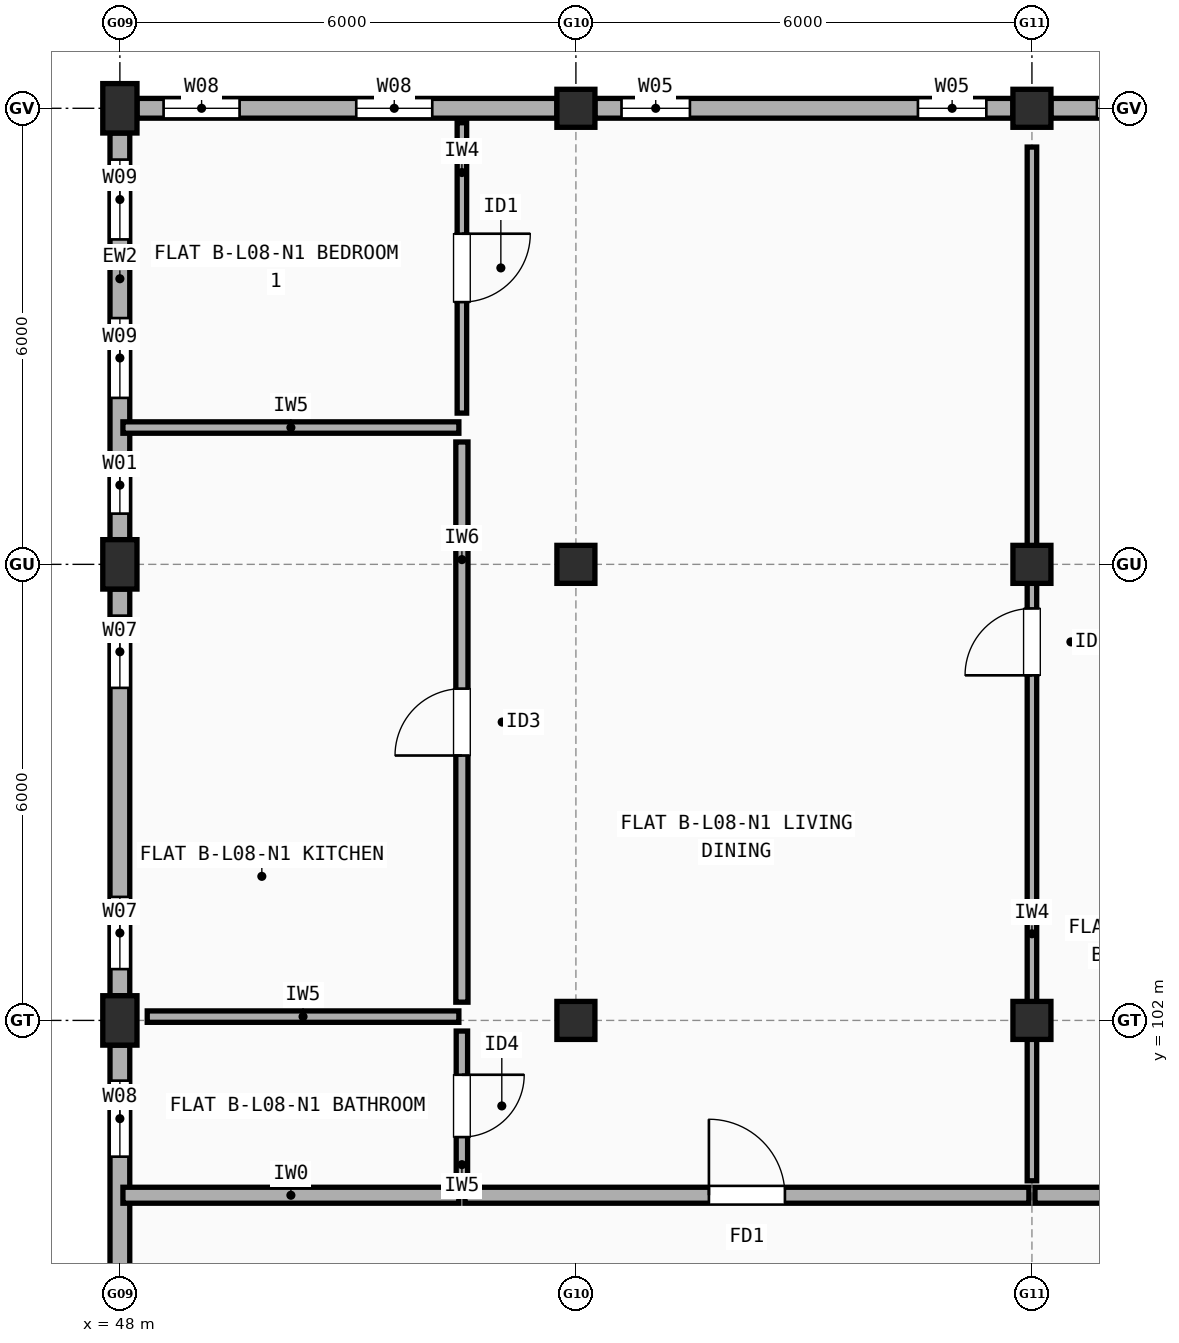
"""IFC4 building model, lengths in metres.
Left out: names, types, materials, properties, quantities, classifications, styles, units other than length and angle.
Written with IfcOpenShell. Run it as: python <this file> out.ifc"""

import sys

from ifc_helpers import new_model, si_unit, direction, frame, frame_2d, origin, origin_2d, place, context, subcontext, project, spatial, rectangle, extrude, element, fill, save


model = new_model("IFC4")
c1 = context("Model", 3, precision=1e-05, world=origin(), true_north=direction((0.0, 1.0)))
c2 = subcontext(c1, "Body", "Model", "MODEL_VIEW")
j1 = project(units=[si_unit("LENGTHUNIT", "METRE"), si_unit("PLANEANGLEUNIT", "RADIAN")], contexts=[c1])
p1 = place(None, origin())
s1 = spatial("IfcSite", under=j1, at=p1, CompositionType="ELEMENT")
p2 = place(p1, origin())
s2 = spatial("IfcBuilding", under=s1, at=p2, CompositionType="ELEMENT")
p3 = place(p2, frame((0.0, 0.0, 26.9)))
s3 = spatial("IfcBuildingStorey", under=s2, at=p3, CompositionType="ELEMENT", Elevation=26.9)
for number, where, z_axis, x_axis in (
    (1, (48.0, 102.0, 0.0), (0.0, 0.0, 1.0), (1.0, 0.0, 0.0)),
    (2, (48.0, 108.0, 0.0), (0.0, 0.0, 1.0), (1.0, 0.0, 0.0)),
    (3, (48.0, 114.0, 0.0), (0.0, 0.0, 1.0), (1.0, 0.0, 0.0)),
):
    element("IfcColumn", number, at=place(p3, frame(where, z_axis=z_axis, x_axis=x_axis)), inside=s3, PredefinedType="COLUMN", context=c2, shape_type="SweptSolid", body=[
        extrude(rectangle(XDim=0.45, YDim=0.65, at=origin_2d()), origin(), (0.0, 0.0, 1.0), 2.98),
    ])
for number, where, z_axis, x_axis in (
    (4, (54.0, 102.0, 0.0), (0.0, 0.0, 1.0), (1.0, 0.0, 0.0)),
    (5, (54.0, 108.0, 0.0), (0.0, 0.0, 1.0), (1.0, 0.0, 0.0)),
    (6, (54.0, 114.0, 0.0), (0.0, 0.0, 1.0), (1.0, 0.0, 0.0)),
    (7, (60.0, 102.0, 0.0), (0.0, 0.0, 1.0), (1.0, 0.0, 0.0)),
    (8, (60.0, 108.0, 0.0), (0.0, 0.0, 1.0), (1.0, 0.0, 0.0)),
    (9, (60.0, 114.0, 0.0), (0.0, 0.0, 1.0), (1.0, 0.0, 0.0)),
):
    element("IfcColumn", number, at=place(p3, frame(where, z_axis=z_axis, x_axis=x_axis)), inside=s3, PredefinedType="COLUMN", context=c2, shape_type="SweptSolid", body=[
        extrude(rectangle(XDim=0.5, YDim=0.5, at=origin_2d()), origin(), (0.0, 0.0, 1.0), 2.98),
    ])
p4 = place(p3, frame((65.75, 114.0, 0.0), z_axis=(0.0, 0.0, 1.0), x_axis=(-1.0, 0.0, 0.0)))
e10 = element("IfcWall", 10, at=p4, inside=s3, PredefinedType="STANDARD", context=c2, shape_type="SweptSolid", body=[
    extrude(rectangle(XDim=5.5, YDim=0.26, at=frame_2d((2.75, 0.0))), origin(), (0.0, 0.0, 1.0), 2.462),
])
p5 = place(p4, frame((0.755, 0.0, 0.9)))
e11 = element("IfcOpeningElement", 11, at=p5, cuts=e10, PredefinedType="OPENING", context=c2, shape_type="SweptSolid", body=[
    extrude(rectangle(XDim=1.2, YDim=1.35, at=frame_2d((0.6, 0.675))), frame((0.0, 0.14, 0.0), z_axis=(0.0, -1.0, 0.0), x_axis=(1.0, 0.0, 0.0)), (0.0, 0.0, 1.0), 0.28),
])
p6 = place(p4, frame((3.395, 0.0, 0.9)))
e12 = element("IfcOpeningElement", 12, at=p6, cuts=e10, PredefinedType="OPENING", context=c2, shape_type="SweptSolid", body=[
    extrude(rectangle(XDim=1.5, YDim=1.4, at=frame_2d((0.75, 0.7))), frame((0.0, 0.14, 0.0), z_axis=(0.0, -1.0, 0.0), x_axis=(1.0, 0.0, 0.0)), (0.0, 0.0, 1.0), 0.28),
])
p7 = place(p3, frame((59.75, 114.0, 0.0), z_axis=(0.0, 0.0, 1.0), x_axis=(-1.0, 0.0, 0.0)))
e13 = element("IfcWall", 13, at=p7, inside=s3, PredefinedType="STANDARD", context=c2, shape_type="SweptSolid", body=[
    extrude(rectangle(XDim=5.5, YDim=0.26, at=frame_2d((2.75, 0.0))), origin(), (0.0, 0.0, 1.0), 2.462),
])
p8 = place(p7, frame((0.35, 0.0, 0.9)))
e14 = element("IfcOpeningElement", 14, at=p8, cuts=e13, PredefinedType="OPENING", context=c2, shape_type="SweptSolid", body=[
    extrude(rectangle(XDim=0.9, YDim=1.4, at=frame_2d((0.45, 0.7))), frame((0.0, 0.14, 0.0), z_axis=(0.0, -1.0, 0.0), x_axis=(1.0, 0.0, 0.0)), (0.0, 0.0, 1.0), 0.28),
])
p9 = place(p7, frame((4.25, 0.0, 0.9)))
e15 = element("IfcOpeningElement", 15, at=p9, cuts=e13, PredefinedType="OPENING", context=c2, shape_type="SweptSolid", body=[
    extrude(rectangle(XDim=0.9, YDim=1.4, at=frame_2d((0.45, 0.7))), frame((0.0, 0.14, 0.0), z_axis=(0.0, -1.0, 0.0), x_axis=(1.0, 0.0, 0.0)), (0.0, 0.0, 1.0), 0.28),
])
p10 = place(p3, frame((53.75, 114.0, 0.0), z_axis=(0.0, 0.0, 1.0), x_axis=(-1.0, 0.0, 0.0)))
e16 = element("IfcWall", 16, at=p10, inside=s3, PredefinedType="STANDARD", context=c2, shape_type="SweptSolid", body=[
    extrude(rectangle(XDim=5.525, YDim=0.26, at=frame_2d((2.762, 0.0))), origin(), (0.0, 0.0, 1.0), 2.462),
])
p11 = place(p10, frame((1.64, 0.0, 0.9)))
e17 = element("IfcOpeningElement", 17, at=p11, cuts=e16, PredefinedType="OPENING", context=c2, shape_type="SweptSolid", body=[
    extrude(rectangle(XDim=1.0, YDim=1.4, at=frame_2d((0.5, 0.7))), frame((0.0, 0.14, 0.0), z_axis=(0.0, -1.0, 0.0), x_axis=(1.0, 0.0, 0.0)), (0.0, 0.0, 1.0), 0.28),
])
p12 = place(p10, frame((4.175, 0.0, 0.9)))
e18 = element("IfcOpeningElement", 18, at=p12, cuts=e16, PredefinedType="OPENING", context=c2, shape_type="SweptSolid", body=[
    extrude(rectangle(XDim=1.0, YDim=1.4, at=frame_2d((0.5, 0.7))), frame((0.0, 0.14, 0.0), z_axis=(0.0, -1.0, 0.0), x_axis=(1.0, 0.0, 0.0)), (0.0, 0.0, 1.0), 0.28),
])
p13 = place(p3, frame((48.0, 113.675, 0.0), z_axis=(0.0, 0.0, 1.0), x_axis=(0.0, -1.0, 0.0)))
e19 = element("IfcWall", 19, at=p13, inside=s3, PredefinedType="STANDARD", context=c2, shape_type="SweptSolid", body=[
    extrude(rectangle(XDim=5.35, YDim=0.26, at=frame_2d((2.675, 0.0))), origin(), (0.0, 0.0, 1.0), 2.462),
])
p14 = place(p13, frame((0.35, 0.0, 0.9)))
e20 = element("IfcOpeningElement", 20, at=p14, cuts=e19, PredefinedType="OPENING", context=c2, shape_type="SweptSolid", body=[
    extrude(rectangle(XDim=1.05, YDim=1.35, at=frame_2d((0.525, 0.675))), frame((0.0, 0.14, 0.0), z_axis=(0.0, -1.0, 0.0), x_axis=(1.0, 0.0, 0.0)), (0.0, 0.0, 1.0), 0.28),
])
p15 = place(p13, frame((2.435, 0.0, 0.9)))
e21 = element("IfcOpeningElement", 21, at=p15, cuts=e19, PredefinedType="OPENING", context=c2, shape_type="SweptSolid", body=[
    extrude(rectangle(XDim=1.05, YDim=1.35, at=frame_2d((0.525, 0.675))), frame((0.0, 0.14, 0.0), z_axis=(0.0, -1.0, 0.0), x_axis=(1.0, 0.0, 0.0)), (0.0, 0.0, 1.0), 0.28),
])
p16 = place(p13, frame((4.258, 0.0, 0.9)))
e22 = element("IfcOpeningElement", 22, at=p16, cuts=e19, PredefinedType="OPENING", context=c2, shape_type="SweptSolid", body=[
    extrude(rectangle(XDim=0.75, YDim=1.15, at=frame_2d((0.375, 0.575))), frame((0.0, 0.14, 0.0), z_axis=(0.0, -1.0, 0.0), x_axis=(1.0, 0.0, 0.0)), (0.0, 0.0, 1.0), 0.28),
])
p17 = place(p3, frame((48.0, 107.675, 0.0), z_axis=(0.0, 0.0, 1.0), x_axis=(0.0, -1.0, 0.0)))
e23 = element("IfcWall", 23, at=p17, inside=s3, PredefinedType="STANDARD", context=c2, shape_type="SweptSolid", body=[
    extrude(rectangle(XDim=5.35, YDim=0.26, at=frame_2d((2.675, 0.0))), origin(), (0.0, 0.0, 1.0), 2.462),
])
p18 = place(p17, frame((0.35, 0.0, 0.9)))
e24 = element("IfcOpeningElement", 24, at=p18, cuts=e23, PredefinedType="OPENING", context=c2, shape_type="SweptSolid", body=[
    extrude(rectangle(XDim=0.95, YDim=1.35, at=frame_2d((0.475, 0.675))), frame((0.0, 0.14, 0.0), z_axis=(0.0, -1.0, 0.0), x_axis=(1.0, 0.0, 0.0)), (0.0, 0.0, 1.0), 0.28),
])
p19 = place(p17, frame((4.05, 0.0, 0.9)))
e25 = element("IfcOpeningElement", 25, at=p19, cuts=e23, PredefinedType="OPENING", context=c2, shape_type="SweptSolid", body=[
    extrude(rectangle(XDim=0.95, YDim=1.35, at=frame_2d((0.475, 0.675))), frame((0.0, 0.14, 0.0), z_axis=(0.0, -1.0, 0.0), x_axis=(1.0, 0.0, 0.0)), (0.0, 0.0, 1.0), 0.28),
])
p20 = place(p3, frame((48.0, 101.675, 0.0), z_axis=(0.0, 0.0, 1.0), x_axis=(0.0, -1.0, 0.0)))
e26 = element("IfcWall", 26, at=p20, inside=s3, PredefinedType="STANDARD", context=c2, shape_type="SweptSolid", body=[
    extrude(rectangle(XDim=5.35, YDim=0.26, at=frame_2d((2.675, 0.0))), origin(), (0.0, 0.0, 1.0), 2.462),
])
p21 = place(p20, frame((0.468, 0.0, 0.9)))
e27 = element("IfcOpeningElement", 27, at=p21, cuts=e26, PredefinedType="OPENING", context=c2, shape_type="SweptSolid", body=[
    extrude(rectangle(XDim=1.0, YDim=1.4, at=frame_2d((0.5, 0.7))), frame((0.0, 0.14, 0.0), z_axis=(0.0, -1.0, 0.0), x_axis=(1.0, 0.0, 0.0)), (0.0, 0.0, 1.0), 0.28),
])
p22 = place(p20, frame((3.083, 0.0, 0.9)))
e28 = element("IfcOpeningElement", 28, at=p22, cuts=e26, PredefinedType="OPENING", context=c2, shape_type="SweptSolid", body=[
    extrude(rectangle(XDim=1.2, YDim=1.35, at=frame_2d((0.6, 0.675))), frame((0.0, 0.14, 0.0), z_axis=(0.0, -1.0, 0.0), x_axis=(1.0, 0.0, 0.0)), (0.0, 0.0, 1.0), 0.28),
])
p23 = place(p3, frame((48.04, 99.7, 0.0), z_axis=(0.0, 0.0, 1.0), x_axis=(1.0, 0.0, 0.0)))
e29 = element("IfcWall", 29, at=p23, inside=s3, PredefinedType="SOLIDWALL", context=c2, shape_type="SweptSolid", body=[
    extrude(rectangle(XDim=4.42, YDim=0.21, at=frame_2d((2.21, 0.0))), origin(), (0.0, 0.0, 1.0), 2.462),
])
p24 = place(p3, frame((52.54, 99.7, 0.0), z_axis=(0.0, 0.0, 1.0), x_axis=(1.0, 0.0, 0.0)))
e30 = element("IfcWall", 30, at=p24, inside=s3, PredefinedType="SOLIDWALL", context=c2, shape_type="SweptSolid", body=[
    extrude(rectangle(XDim=7.42, YDim=0.21, at=frame_2d((3.71, 0.0))), origin(), (0.0, 0.0, 1.0), 2.508),
])
p25 = place(p24, frame((3.21, 0.0, 0.0)))
e31 = element("IfcOpeningElement", 31, at=p25, cuts=e30, PredefinedType="OPENING", context=c2, shape_type="SweptSolid", body=[
    extrude(rectangle(XDim=1.0, YDim=2.15, at=frame_2d((0.5, 1.075))), frame((0.0, 0.115, 0.0), z_axis=(0.0, -1.0, 0.0), x_axis=(1.0, 0.0, 0.0)), (0.0, 0.0, 1.0), 0.23),
])
p26 = place(p3, frame((52.5, 109.99, 0.0), z_axis=(0.0, 0.0, 1.0), x_axis=(0.0, 1.0, 0.0)))
e32 = element("IfcWall", 32, at=p26, inside=s3, PredefinedType="PARTITIONING", context=c2, shape_type="SweptSolid", body=[
    extrude(rectangle(XDim=3.82, YDim=0.125, at=frame_2d((1.91, 0.0))), origin(), (0.0, 0.0, 1.0), 2.98),
])
p27 = place(p26, frame((1.46, 0.0, 0.0)))
e33 = element("IfcOpeningElement", 33, at=p27, cuts=e32, PredefinedType="OPENING", context=c2, shape_type="SweptSolid", body=[
    extrude(rectangle(XDim=0.9, YDim=2.1, at=frame_2d((0.45, 1.05))), frame((0.0, 0.073, 0.0), z_axis=(0.0, -1.0, 0.0), x_axis=(1.0, 0.0, 0.0)), (0.0, 0.0, 1.0), 0.145),
])
p28 = place(p3, frame((52.5, 102.24, 0.0), z_axis=(0.0, 0.0, 1.0), x_axis=(0.0, 1.0, 0.0)))
e34 = element("IfcWall", 34, at=p28, inside=s3, PredefinedType="PLUMBINGWALL", context=c2, shape_type="SweptSolid", body=[
    extrude(rectangle(XDim=7.37, YDim=0.16, at=frame_2d((3.685, 0.0))), origin(), (0.0, 0.0, 1.0), 2.462),
])
p29 = place(p28, frame((3.245, 0.0, 0.0)))
e35 = element("IfcOpeningElement", 35, at=p29, cuts=e34, PredefinedType="OPENING", context=c2, shape_type="SweptSolid", body=[
    extrude(rectangle(XDim=0.88, YDim=2.1, at=frame_2d((0.44, 1.05))), frame((0.0, 0.09, 0.0), z_axis=(0.0, -1.0, 0.0), x_axis=(1.0, 0.0, 0.0)), (0.0, 0.0, 1.0), 0.18),
])
p30 = place(p3, frame((52.5, 99.89, 0.0), z_axis=(0.0, 0.0, 1.0), x_axis=(0.0, 1.0, 0.0)))
e36 = element("IfcWall", 36, at=p30, inside=s3, PredefinedType="PARTITIONING", context=c2, shape_type="SweptSolid", body=[
    extrude(rectangle(XDim=1.97, YDim=0.15, at=frame_2d((0.985, 0.0))), origin(), (0.0, 0.0, 1.0), 2.98),
])
p31 = place(p30, frame((0.575, 0.0, 0.0)))
e37 = element("IfcOpeningElement", 37, at=p31, cuts=e36, PredefinedType="OPENING", context=c2, shape_type="SweptSolid", body=[
    extrude(rectangle(XDim=0.82, YDim=2.08, at=frame_2d((0.41, 1.04))), frame((0.0, 0.085, 0.0), z_axis=(0.0, -1.0, 0.0), x_axis=(1.0, 0.0, 0.0)), (0.0, 0.0, 1.0), 0.17),
])
p32 = place(p3, frame((48.04, 109.8, 0.0), z_axis=(0.0, 0.0, 1.0), x_axis=(1.0, 0.0, 0.0)))
e38 = element("IfcWall", 38, at=p32, inside=s3, PredefinedType="PARTITIONING", context=c2, shape_type="SweptSolid", body=[
    extrude(rectangle(XDim=4.42, YDim=0.15, at=frame_2d((2.21, 0.0))), origin(), (0.0, 0.0, 1.0), 2.462),
])
p33 = place(p3, frame((48.36, 102.05, 0.0), z_axis=(0.0, 0.0, 1.0), x_axis=(1.0, 0.0, 0.0)))
e39 = element("IfcWall", 39, at=p33, inside=s3, PredefinedType="PARTITIONING", context=c2, shape_type="SweptSolid", body=[
    extrude(rectangle(XDim=4.1, YDim=0.15, at=frame_2d((2.05, 0.0))), origin(), (0.0, 0.0, 1.0), 2.462),
])
p34 = place(p3, frame((60.04, 99.7, 0.0), z_axis=(0.0, 0.0, 1.0), x_axis=(1.0, 0.0, 0.0)))
e40 = element("IfcWall", 40, at=p34, inside=s3, PredefinedType="SOLIDWALL", context=c2, shape_type="SweptSolid", body=[
    extrude(rectangle(XDim=2.92, YDim=0.21, at=frame_2d((1.46, 0.0))), origin(), (0.0, 0.0, 1.0), 2.508),
])
p35 = place(p3, frame((60.0, 99.89, 0.0), z_axis=(0.0, 0.0, 1.0), x_axis=(0.0, 1.0, 0.0)))
e41 = element("IfcWall", 41, at=p35, inside=s3, PredefinedType="PARTITIONING", context=c2, shape_type="SweptSolid", body=[
    extrude(rectangle(XDim=13.6, YDim=0.125, at=frame_2d((6.8, 0.0))), origin(), (0.0, 0.0, 1.0), 2.458),
])
p36 = place(p35, frame((6.65, 0.0, 0.0)))
e42 = element("IfcOpeningElement", 42, at=p36, cuts=e41, PredefinedType="OPENING", context=c2, shape_type="SweptSolid", body=[
    extrude(rectangle(XDim=0.88, YDim=2.1, at=frame_2d((0.44, 1.05))), frame((0.0, 0.073, 0.0), z_axis=(0.0, -1.0, 0.0), x_axis=(1.0, 0.0, 0.0)), (0.0, 0.0, 1.0), 0.145),
])
p37 = place(p6, origin())
e43 = element("IfcWindow", 43, at=p37, inside=s3, PartitioningType="SINGLE_PANEL", PredefinedType="WINDOW", context=c2, shape_type="SweptSolid", body=[
    extrude(rectangle(XDim=1.5, YDim=1.4, at=frame_2d((0.75, 0.7))), frame((0.0, 0.03, 0.0), z_axis=(0.0, -1.0, 0.0), x_axis=(1.0, 0.0, 0.0)), (0.0, 0.0, 1.0), 0.06),
])
fill(e12, e43)
p38 = place(p8, origin())
e44 = element("IfcWindow", 44, at=p38, inside=s3, PartitioningType="SINGLE_PANEL", PredefinedType="WINDOW", context=c2, shape_type="SweptSolid", body=[
    extrude(rectangle(XDim=0.9, YDim=1.4, at=frame_2d((0.45, 0.7))), frame((0.0, 0.03, 0.0), z_axis=(0.0, -1.0, 0.0), x_axis=(1.0, 0.0, 0.0)), (0.0, 0.0, 1.0), 0.06),
])
fill(e14, e44)
p39 = place(p9, origin())
e45 = element("IfcWindow", 45, at=p39, inside=s3, PartitioningType="SINGLE_PANEL", PredefinedType="WINDOW", context=c2, shape_type="SweptSolid", body=[
    extrude(rectangle(XDim=0.9, YDim=1.4, at=frame_2d((0.45, 0.7))), frame((0.0, 0.03, 0.0), z_axis=(0.0, -1.0, 0.0), x_axis=(1.0, 0.0, 0.0)), (0.0, 0.0, 1.0), 0.06),
])
fill(e15, e45)
p40 = place(p11, origin())
e46 = element("IfcWindow", 46, at=p40, inside=s3, PartitioningType="SINGLE_PANEL", PredefinedType="WINDOW", context=c2, shape_type="SweptSolid", body=[
    extrude(rectangle(XDim=1.0, YDim=1.4, at=frame_2d((0.5, 0.7))), frame((0.0, 0.03, 0.0), z_axis=(0.0, -1.0, 0.0), x_axis=(1.0, 0.0, 0.0)), (0.0, 0.0, 1.0), 0.06),
])
fill(e17, e46)
p41 = place(p12, origin())
e47 = element("IfcWindow", 47, at=p41, inside=s3, PartitioningType="SINGLE_PANEL", PredefinedType="WINDOW", context=c2, shape_type="SweptSolid", body=[
    extrude(rectangle(XDim=1.0, YDim=1.4, at=frame_2d((0.5, 0.7))), frame((0.0, 0.03, 0.0), z_axis=(0.0, -1.0, 0.0), x_axis=(1.0, 0.0, 0.0)), (0.0, 0.0, 1.0), 0.06),
])
fill(e18, e47)
p42 = place(p14, origin())
e48 = element("IfcWindow", 48, at=p42, inside=s3, PartitioningType="SINGLE_PANEL", PredefinedType="WINDOW", context=c2, shape_type="SweptSolid", body=[
    extrude(rectangle(XDim=1.05, YDim=1.35, at=frame_2d((0.525, 0.675))), frame((0.0, 0.03, 0.0), z_axis=(0.0, -1.0, 0.0), x_axis=(1.0, 0.0, 0.0)), (0.0, 0.0, 1.0), 0.06),
])
fill(e20, e48)
p43 = place(p15, origin())
e49 = element("IfcWindow", 49, at=p43, inside=s3, PartitioningType="SINGLE_PANEL", PredefinedType="WINDOW", context=c2, shape_type="SweptSolid", body=[
    extrude(rectangle(XDim=1.05, YDim=1.35, at=frame_2d((0.525, 0.675))), frame((0.0, 0.03, 0.0), z_axis=(0.0, -1.0, 0.0), x_axis=(1.0, 0.0, 0.0)), (0.0, 0.0, 1.0), 0.06),
])
fill(e21, e49)
p44 = place(p16, origin())
e50 = element("IfcWindow", 50, at=p44, inside=s3, PartitioningType="SINGLE_PANEL", PredefinedType="WINDOW", context=c2, shape_type="SweptSolid", body=[
    extrude(rectangle(XDim=0.75, YDim=1.15, at=frame_2d((0.375, 0.575))), frame((0.0, 0.03, 0.0), z_axis=(0.0, -1.0, 0.0), x_axis=(1.0, 0.0, 0.0)), (0.0, 0.0, 1.0), 0.06),
])
fill(e22, e50)
p45 = place(p18, origin())
e51 = element("IfcWindow", 51, at=p45, inside=s3, PartitioningType="SINGLE_PANEL", PredefinedType="WINDOW", context=c2, shape_type="SweptSolid", body=[
    extrude(rectangle(XDim=0.95, YDim=1.35, at=frame_2d((0.475, 0.675))), frame((0.0, 0.03, 0.0), z_axis=(0.0, -1.0, 0.0), x_axis=(1.0, 0.0, 0.0)), (0.0, 0.0, 1.0), 0.06),
])
fill(e24, e51)
p46 = place(p19, origin())
e52 = element("IfcWindow", 52, at=p46, inside=s3, PartitioningType="SINGLE_PANEL", PredefinedType="WINDOW", context=c2, shape_type="SweptSolid", body=[
    extrude(rectangle(XDim=0.95, YDim=1.35, at=frame_2d((0.475, 0.675))), frame((0.0, 0.03, 0.0), z_axis=(0.0, -1.0, 0.0), x_axis=(1.0, 0.0, 0.0)), (0.0, 0.0, 1.0), 0.06),
])
fill(e25, e52)
p47 = place(p21, origin())
e53 = element("IfcWindow", 53, at=p47, inside=s3, PartitioningType="SINGLE_PANEL", PredefinedType="WINDOW", context=c2, shape_type="SweptSolid", body=[
    extrude(rectangle(XDim=1.0, YDim=1.4, at=frame_2d((0.5, 0.7))), frame((0.0, 0.03, 0.0), z_axis=(0.0, -1.0, 0.0), x_axis=(1.0, 0.0, 0.0)), (0.0, 0.0, 1.0), 0.06),
])
fill(e27, e53)
p48 = place(p25, origin())
e54 = element("IfcDoor", 54, at=p48, inside=s3, OperationType="SINGLE_SWING_LEFT", PredefinedType="DOOR", context=c2, shape_type="SweptSolid", body=[
    extrude(rectangle(XDim=1.0, YDim=2.15, at=frame_2d((0.5, 1.075))), frame((0.0, 0.025, 0.0), z_axis=(0.0, -1.0, 0.0), x_axis=(1.0, 0.0, 0.0)), (0.0, 0.0, 1.0), 0.05),
])
fill(e31, e54)
p49 = place(p27, origin())
e55 = element("IfcDoor", 55, at=p49, inside=s3, OperationType="SINGLE_SWING_RIGHT", PredefinedType="DOOR", context=c2, shape_type="SweptSolid", body=[
    extrude(rectangle(XDim=0.9, YDim=2.1, at=frame_2d((0.45, 1.05))), frame((0.0, 0.025, 0.0), z_axis=(0.0, -1.0, 0.0), x_axis=(1.0, 0.0, 0.0)), (0.0, 0.0, 1.0), 0.05),
])
fill(e33, e55)
p50 = place(p29, origin())
e56 = element("IfcDoor", 56, at=p50, inside=s3, OperationType="SINGLE_SWING_LEFT", PredefinedType="DOOR", context=c2, shape_type="SweptSolid", body=[
    extrude(rectangle(XDim=0.88, YDim=2.1, at=frame_2d((0.44, 1.05))), frame((0.0, 0.025, 0.0), z_axis=(0.0, -1.0, 0.0), x_axis=(1.0, 0.0, 0.0)), (0.0, 0.0, 1.0), 0.05),
])
fill(e35, e56)
p51 = place(p31, origin())
e57 = element("IfcDoor", 57, at=p51, inside=s3, OperationType="SINGLE_SWING_RIGHT", PredefinedType="DOOR", context=c2, shape_type="SweptSolid", body=[
    extrude(rectangle(XDim=0.82, YDim=2.08, at=frame_2d((0.41, 1.04))), frame((0.0, 0.025, 0.0), z_axis=(0.0, -1.0, 0.0), x_axis=(1.0, 0.0, 0.0)), (0.0, 0.0, 1.0), 0.05),
])
fill(e37, e57)
p52 = place(p36, origin())
e58 = element("IfcDoor", 58, at=p52, inside=s3, OperationType="SINGLE_SWING_LEFT", PredefinedType="DOOR", context=c2, shape_type="SweptSolid", body=[
    extrude(rectangle(XDim=0.88, YDim=2.1, at=frame_2d((0.44, 1.05))), frame((0.0, 0.025, 0.0), z_axis=(0.0, -1.0, 0.0), x_axis=(1.0, 0.0, 0.0)), (0.0, 0.0, 1.0), 0.05),
])
fill(e42, e58)
save(model, sys.argv[1])
